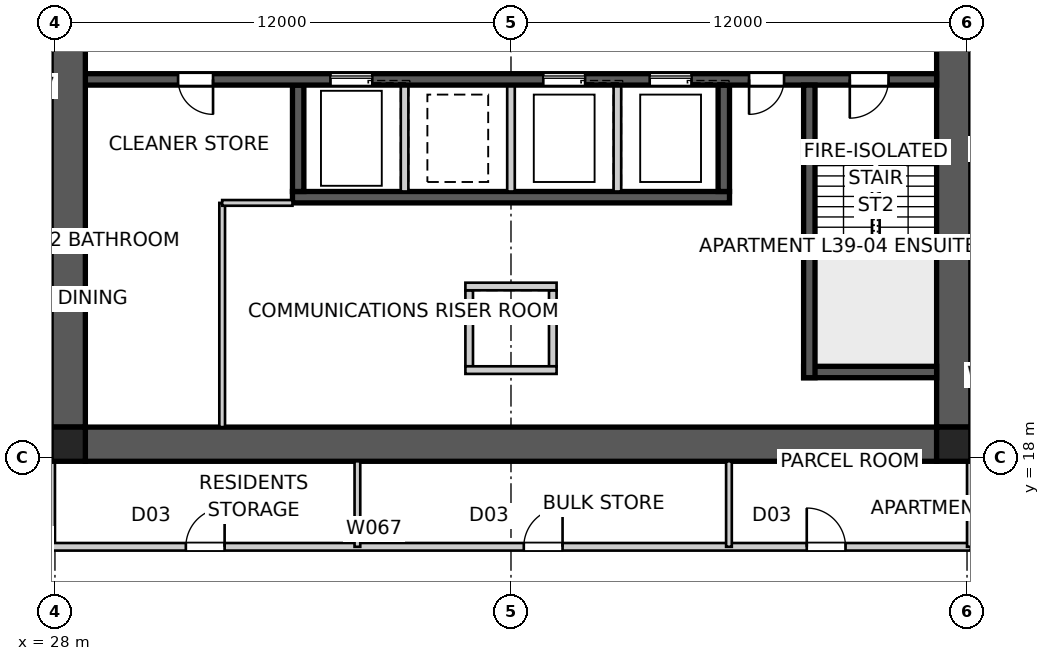
"""IFC4 building model, lengths in metres.
Left out: names, types, materials, properties, quantities, classifications, styles, units other than length and angle.
Written with IfcOpenShell. Run it as: python <this file> out.ifc"""

import sys

from ifc_helpers import new_model, si_unit, direction, frame, frame_2d, origin, origin_2d, place, context, subcontext, project, spatial, polyline, rectangle, outline, extrude, element, fill, save


model = new_model("IFC4")
c1 = context("Model", 3, precision=1e-05, world=origin(), true_north=direction((0.0, 1.0)))
c2 = subcontext(c1, "Body", "Model", "MODEL_VIEW")
j1 = project(units=[si_unit("LENGTHUNIT", "METRE"), si_unit("PLANEANGLEUNIT", "RADIAN")], contexts=[c1])
p1 = place(None, origin())
s1 = spatial("IfcSite", under=j1, at=p1, CompositionType="ELEMENT")
p2 = place(p1, origin())
s2 = spatial("IfcBuilding", under=s1, at=p2, CompositionType="ELEMENT")
p3 = place(p2, frame((0.0, 0.0, 143.8)))
s3 = spatial("IfcBuildingStorey", under=s2, at=p3, CompositionType="ELEMENT", Elevation=143.8)
p4 = place(p3, frame((51.2, 18.35, 0.0), z_axis=(0.0, 0.0, 1.0), x_axis=(-1.0, 0.0, 0.0)))
e1 = element("IfcWall", 1, at=p4, inside=s3, PredefinedType="SHEAR", context=c2, shape_type="SweptSolid", body=[
    extrude(outline(polyline([(0.0, -0.45), (22.4, -0.45), (22.4, -0.025), (22.85, -0.025), (22.85, 0.025), (22.4, 0.025), (22.4, 0.45), (0.0, 0.45), (0.0, 0.025), (-0.45, 0.025), (-0.45, -0.025), (0.0, -0.025), (0.0, -0.45)])), origin(), (0.0, 0.0, 1.0), 3.4),
])
p5 = place(p3, frame((51.65, 18.8, 0.0), z_axis=(0.0, 0.0, 1.0), x_axis=(0.0, 1.0, 0.0)))
e2 = element("IfcWall", 2, at=p5, inside=s3, PredefinedType="SHEAR", context=c2, shape_type="SweptSolid", body=[
    extrude(outline(polyline([(0.0, -0.45), (22.4, -0.45), (22.4, -0.025), (22.85, -0.025), (22.85, 0.025), (22.4, 0.025), (22.4, 0.45), (0.0, 0.45), (0.0, 0.025), (-0.45, 0.025), (-0.45, -0.025), (0.0, -0.025), (0.0, -0.45)])), origin(), (0.0, 0.0, 1.0), 3.4),
])
p6 = place(p5, frame((11.14, 0.0, 0.0)))
e3 = element("IfcOpeningElement", 3, at=p6, cuts=e2, PredefinedType="OPENING", context=c2, shape_type="SweptSolid", body=[
    extrude(rectangle(XDim=1.02, YDim=2.4, at=frame_2d((0.51, 1.2))), frame((0.0, 0.46, 0.0), z_axis=(0.0, -1.0, 0.0), x_axis=(1.0, 0.0, 0.0)), (0.0, 0.0, 1.0), 0.92),
])
p7 = place(p3, frame((28.35, 41.2, 0.0), z_axis=(0.0, 0.0, 1.0), x_axis=(0.0, -1.0, 0.0)))
e4 = element("IfcWall", 4, at=p7, inside=s3, PredefinedType="SHEAR", context=c2, shape_type="SweptSolid", body=[
    extrude(outline(polyline([(0.0, -0.45), (22.4, -0.45), (22.4, -0.025), (22.85, -0.025), (22.85, 0.025), (22.4, 0.025), (22.4, 0.45), (0.0, 0.45), (0.0, 0.025), (-0.45, 0.025), (-0.45, -0.025), (0.0, -0.025), (0.0, -0.45)])), origin(), (0.0, 0.0, 1.0), 3.4),
])
p8 = place(p7, frame((11.14, 0.0, 0.0)))
e5 = element("IfcOpeningElement", 5, at=p8, cuts=e4, PredefinedType="OPENING", context=c2, shape_type="SweptSolid", body=[
    extrude(rectangle(XDim=1.02, YDim=2.4, at=frame_2d((0.51, 1.2))), frame((0.0, 0.46, 0.0), z_axis=(0.0, -1.0, 0.0), x_axis=(1.0, 0.0, 0.0)), (0.0, 0.0, 1.0), 0.92),
])
p9 = place(p3, frame((51.2, 27.95, 0.0), z_axis=(0.0, 0.0, 1.0), x_axis=(-1.0, 0.0, 0.0)))
e6 = element("IfcWall", 6, at=p9, inside=s3, PredefinedType="SHEAR", context=c2, shape_type="SweptSolid", body=[
    extrude(rectangle(XDim=22.4, YDim=0.3, at=frame_2d((11.2, 0.0))), origin(), (0.0, 0.0, 1.0), 3.4),
])
p10 = place(p9, frame((19.04, 0.0, 0.0)))
e7 = element("IfcOpeningElement", 7, at=p10, cuts=e6, PredefinedType="OPENING", context=c2, shape_type="SweptSolid", body=[
    extrude(rectangle(XDim=0.92, YDim=2.1, at=frame_2d((0.46, 1.05))), frame((0.0, 0.16, 0.0), z_axis=(0.0, -1.0, 0.0), x_axis=(1.0, 0.0, 0.0)), (0.0, 0.0, 1.0), 0.32),
])
p11 = place(p9, frame((1.265, 0.0, 0.0)))
e8 = element("IfcOpeningElement", 8, at=p11, cuts=e6, PredefinedType="OPENING", context=c2, shape_type="SweptSolid", body=[
    extrude(rectangle(XDim=1.02, YDim=2.1, at=frame_2d((0.51, 1.05))), frame((0.0, 0.16, 0.0), z_axis=(0.0, -1.0, 0.0), x_axis=(1.0, 0.0, 0.0)), (0.0, 0.0, 1.0), 0.32),
])
p12 = place(p9, frame((4.015, 0.0, 0.0)))
e9 = element("IfcOpeningElement", 9, at=p12, cuts=e6, PredefinedType="OPENING", context=c2, shape_type="SweptSolid", body=[
    extrude(rectangle(XDim=0.92, YDim=2.1, at=frame_2d((0.46, 1.05))), frame((0.0, 0.16, 0.0), z_axis=(0.0, -1.0, 0.0), x_axis=(1.0, 0.0, 0.0)), (0.0, 0.0, 1.0), 0.32),
])
p13 = place(p9, frame((6.45, 0.0, 0.0)))
e10 = element("IfcOpeningElement", 10, at=p13, cuts=e6, PredefinedType="OPENING", context=c2, shape_type="SweptSolid", body=[
    extrude(rectangle(XDim=1.1, YDim=2.1, at=frame_2d((0.55, 1.05))), frame((0.0, 0.16, 0.0), z_axis=(0.0, -1.0, 0.0), x_axis=(1.0, 0.0, 0.0)), (0.0, 0.0, 1.0), 0.32),
])
p14 = place(p9, frame((9.25, 0.0, 0.0)))
e11 = element("IfcOpeningElement", 11, at=p14, cuts=e6, PredefinedType="OPENING", context=c2, shape_type="SweptSolid", body=[
    extrude(rectangle(XDim=1.1, YDim=2.1, at=frame_2d((0.55, 1.05))), frame((0.0, 0.16, 0.0), z_axis=(0.0, -1.0, 0.0), x_axis=(1.0, 0.0, 0.0)), (0.0, 0.0, 1.0), 0.32),
])
p15 = place(p9, frame((14.85, 0.0, 0.0)))
e12 = element("IfcOpeningElement", 12, at=p15, cuts=e6, PredefinedType="OPENING", context=c2, shape_type="SweptSolid", body=[
    extrude(rectangle(XDim=1.1, YDim=2.1, at=frame_2d((0.55, 1.05))), frame((0.0, 0.16, 0.0), z_axis=(0.0, -1.0, 0.0), x_axis=(1.0, 0.0, 0.0)), (0.0, 0.0, 1.0), 0.32),
])
p16 = place(p3, frame((45.75, 24.85, 0.0), z_axis=(0.0, 0.0, 1.0), x_axis=(-1.0, 0.0, 0.0)))
e13 = element("IfcWall", 13, at=p16, inside=s3, PredefinedType="SHEAR", context=c2, shape_type="SweptSolid", body=[
    extrude(rectangle(XDim=11.5, YDim=0.3, at=frame_2d((5.75, 0.0))), origin(), (0.0, 0.0, 1.0), 3.4),
])
p17 = place(p3, frame((45.6, 27.8, 0.0), z_axis=(0.0, 0.0, 1.0), x_axis=(0.0, -1.0, 0.0)))
e14 = element("IfcWall", 14, at=p17, inside=s3, PredefinedType="SHEAR", context=c2, shape_type="SweptSolid", body=[
    extrude(rectangle(XDim=2.8, YDim=0.3, at=frame_2d((1.4, 0.0))), origin(), (0.0, 0.0, 1.0), 3.4),
])
for number, where, z_axis, x_axis in (
    (15, (42.8, 27.8, 0.0), (0.0, 0.0, 1.0), (0.0, -1.0, 0.0)),
    (16, (40.0, 27.8, 0.0), (0.0, 0.0, 1.0), (0.0, -1.0, 0.0)),
    (17, (37.2, 27.8, 0.0), (0.0, 0.0, 1.0), (0.0, -1.0, 0.0)),
):
    element("IfcWall", number, at=place(p3, frame(where, z_axis=z_axis, x_axis=x_axis)), inside=s3, PredefinedType="SOLIDWALL", context=c2, shape_type="SweptSolid", body=[
        extrude(rectangle(XDim=2.8, YDim=0.2, at=frame_2d((1.4, 0.0))), origin(), (0.0, 0.0, 1.0), 3.4),
    ])
p18 = place(p3, frame((34.4, 27.8, 0.0), z_axis=(0.0, 0.0, 1.0), x_axis=(0.0, -1.0, 0.0)))
e18 = element("IfcWall", 18, at=p18, inside=s3, PredefinedType="SHEAR", context=c2, shape_type="SweptSolid", body=[
    extrude(rectangle(XDim=2.8, YDim=0.3, at=frame_2d((1.4, 0.0))), origin(), (0.0, 0.0, 1.0), 3.4),
])
p19 = place(p3, frame((47.85, 27.8, 0.0), z_axis=(0.0, 0.0, 1.0), x_axis=(0.0, -1.0, 0.0)))
e19 = element("IfcWall", 19, at=p19, inside=s3, PredefinedType="SHEAR", context=c2, shape_type="SweptSolid", body=[
    extrude(rectangle(XDim=7.7, YDim=0.3, at=frame_2d((3.85, 0.0))), origin(), (0.0, 0.0, 1.0), 3.4),
])
p20 = place(p3, frame((51.2, 20.25, 0.0), z_axis=(0.0, 0.0, 1.0), x_axis=(-1.0, 0.0, 0.0)))
e20 = element("IfcWall", 20, at=p20, inside=s3, PredefinedType="SHEAR", context=c2, shape_type="SweptSolid", body=[
    extrude(rectangle(XDim=3.5, YDim=0.3, at=frame_2d((1.75, 0.0))), origin(), (0.0, 0.0, 1.0), 3.4),
])
for number, where, z_axis, x_axis in (
    (21, (38.9, 22.4, 0.0), (0.0, 0.0, 1.0), (0.0, -1.0, 0.0)),
    (22, (41.1, 22.4, 0.0), (0.0, 0.0, 1.0), (0.0, -1.0, 0.0)),
):
    element("IfcWall", number, at=place(p3, frame(where, z_axis=z_axis, x_axis=x_axis)), inside=s3, PredefinedType="SOLIDWALL", context=c2, shape_type="SweptSolid", body=[
        extrude(rectangle(XDim=2.0, YDim=0.2, at=frame_2d((1.0, 0.0))), origin(), (0.0, 0.0, 1.0), 3.4),
    ])
for number, where, z_axis, x_axis in (
    (23, (38.8, 22.5, 0.0), (0.0, 0.0, 1.0), (1.0, 0.0, 0.0)),
    (24, (38.8, 20.3, 0.0), (0.0, 0.0, 1.0), (1.0, 0.0, 0.0)),
):
    element("IfcWall", number, at=place(p3, frame(where, z_axis=z_axis, x_axis=x_axis)), inside=s3, PredefinedType="SOLIDWALL", context=c2, shape_type="SweptSolid", body=[
        extrude(rectangle(XDim=2.4, YDim=0.2, at=frame_2d((1.2, 0.0))), origin(), (0.0, 0.0, 1.0), 3.4),
    ])
for number, where, z_axis, x_axis in (
    (25, (28.35, 18.35, 0.0), (0.0, 0.0, 1.0), (1.0, 0.0, 0.0)),
    (26, (51.65, 18.35, 0.0), (0.0, 0.0, 1.0), (1.0, 0.0, 0.0)),
):
    element("IfcColumn", number, at=place(p3, frame(where, z_axis=z_axis, x_axis=x_axis)), inside=s3, PredefinedType="COLUMN", context=c2, shape_type="SweptSolid", body=[
        extrude(rectangle(XDim=0.9, YDim=0.9, at=origin_2d()), origin(), (0.0, 0.0, 1.0), 3.4),
    ])
p21 = place(p3, frame((32.4, 18.8, 0.0), z_axis=(0.0, 0.0, 1.0), x_axis=(0.0, 1.0, 0.0)))
e27 = element("IfcWall", 27, at=p21, inside=s3, PredefinedType="SOLIDWALL", context=c2, shape_type="SweptSolid", body=[
    extrude(rectangle(XDim=5.9, YDim=0.15, at=frame_2d((2.95, 0.0))), origin(), (0.0, 0.0, 1.0), 3.25),
])
p22 = place(p3, frame((32.4, 24.7, 0.0), z_axis=(0.0, 0.0, 1.0), x_axis=(1.0, 0.0, 0.0)))
e28 = element("IfcWall", 28, at=p22, inside=s3, PredefinedType="SOLIDWALL", context=c2, shape_type="SweptSolid", body=[
    extrude(rectangle(XDim=1.85, YDim=0.15, at=frame_2d((0.925, 0.0))), origin(), (0.0, 0.0, 1.0), 3.25),
])
p23 = place(p3, frame((27.9, 17.95, 0.0), z_axis=(0.0, 0.0, 1.0), x_axis=(0.0, -1.0, 0.0)))
e29 = element("IfcWall", 29, at=p23, inside=s3, PredefinedType="PARTITIONING", context=c2, shape_type="SweptSolid", body=[
    extrude(rectangle(XDim=2.3, YDim=0.2, at=frame_2d((1.15, 0.0))), origin(), (0.0, 0.0, 1.0), 3.25),
])
p24 = place(p3, frame((27.9, 15.65, 0.0), z_axis=(0.0, 0.0, 1.0), x_axis=(1.0, 0.0, 0.0)))
e30 = element("IfcWall", 30, at=p24, inside=s3, PredefinedType="PARTITIONING", context=c2, shape_type="SweptSolid", body=[
    extrude(rectangle(XDim=24.2, YDim=0.2, at=frame_2d((12.1, 0.0))), origin(), (0.0, 0.0, 1.0), 3.25),
])
p25 = place(p24, frame((12.437, 0.0, 0.0)))
e31 = element("IfcOpeningElement", 31, at=p25, cuts=e30, PredefinedType="OPENING", context=c2, shape_type="SweptSolid", body=[
    extrude(rectangle(XDim=1.02, YDim=2.1, at=frame_2d((0.51, 1.05))), frame((0.0, 0.11, 0.0), z_axis=(0.0, -1.0, 0.0), x_axis=(1.0, 0.0, 0.0)), (0.0, 0.0, 1.0), 0.22),
])
p26 = place(p24, frame((3.544, 0.0, 0.0)))
e32 = element("IfcOpeningElement", 32, at=p26, cuts=e30, PredefinedType="OPENING", context=c2, shape_type="SweptSolid", body=[
    extrude(rectangle(XDim=1.02, YDim=2.1, at=frame_2d((0.51, 1.05))), frame((0.0, 0.11, 0.0), z_axis=(0.0, -1.0, 0.0), x_axis=(1.0, 0.0, 0.0)), (0.0, 0.0, 1.0), 0.22),
])
p27 = place(p24, frame((19.883, 0.0, 0.0)))
e33 = element("IfcOpeningElement", 33, at=p27, cuts=e30, PredefinedType="OPENING", context=c2, shape_type="SweptSolid", body=[
    extrude(rectangle(XDim=1.02, YDim=2.1, at=frame_2d((0.51, 1.05))), frame((0.0, 0.11, 0.0), z_axis=(0.0, -1.0, 0.0), x_axis=(1.0, 0.0, 0.0)), (0.0, 0.0, 1.0), 0.22),
])
p28 = place(p3, frame((52.1, 15.65, 0.0), z_axis=(0.0, 0.0, 1.0), x_axis=(0.0, 1.0, 0.0)))
e34 = element("IfcWall", 34, at=p28, inside=s3, PredefinedType="PARTITIONING", context=c2, shape_type="SweptSolid", body=[
    extrude(rectangle(XDim=3.17, YDim=0.2, at=frame_2d((1.585, 0.0))), origin(), (0.0, 0.0, 1.0), 3.25),
])
p29 = place(p3, frame((35.958, 15.65, 0.0), z_axis=(0.0, 0.0, 1.0), x_axis=(0.0, 1.0, 0.0)))
e35 = element("IfcWall", 35, at=p29, inside=s3, PredefinedType="SOLIDWALL", context=c2, shape_type="SweptSolid", body=[
    extrude(rectangle(XDim=2.25, YDim=0.15, at=frame_2d((1.125, 0.0))), origin(), (0.0, 0.0, 1.0), 3.25),
])
p30 = place(p3, frame((45.735, 15.65, 0.0), z_axis=(0.0, 0.0, 1.0), x_axis=(0.0, 1.0, 0.0)))
e36 = element("IfcWall", 36, at=p30, inside=s3, PredefinedType="SOLIDWALL", context=c2, shape_type="SweptSolid", body=[
    extrude(rectangle(XDim=2.25, YDim=0.15, at=frame_2d((1.125, 0.0))), origin(), (0.0, 0.0, 1.0), 2.796),
])
p31 = place(p10, origin())
e37 = element("IfcDoor", 37, at=p31, inside=s3, OperationType="SINGLE_SWING_LEFT", PredefinedType="DOOR", context=c2, shape_type="SweptSolid", body=[
    extrude(rectangle(XDim=0.92, YDim=2.1, at=frame_2d((0.46, 1.05))), frame((0.0, 0.025, 0.0), z_axis=(0.0, -1.0, 0.0), x_axis=(1.0, 0.0, 0.0)), (0.0, 0.0, 1.0), 0.05),
])
fill(e7, e37)
p32 = place(p11, origin())
e38 = element("IfcDoor", 38, at=p32, inside=s3, OperationType="SINGLE_SWING_RIGHT", PredefinedType="DOOR", context=c2, shape_type="SweptSolid", body=[
    extrude(rectangle(XDim=1.02, YDim=2.1, at=frame_2d((0.51, 1.05))), frame((0.0, 0.025, 0.0), z_axis=(0.0, -1.0, 0.0), x_axis=(1.0, 0.0, 0.0)), (0.0, 0.0, 1.0), 0.05),
])
fill(e8, e38)
p33 = place(p12, origin())
e39 = element("IfcDoor", 39, at=p33, inside=s3, OperationType="SINGLE_SWING_RIGHT", PredefinedType="DOOR", context=c2, shape_type="SweptSolid", body=[
    extrude(rectangle(XDim=0.92, YDim=2.1, at=frame_2d((0.46, 1.05))), frame((0.0, 0.025, 0.0), z_axis=(0.0, -1.0, 0.0), x_axis=(1.0, 0.0, 0.0)), (0.0, 0.0, 1.0), 0.05),
])
fill(e9, e39)
p34 = place(p25, origin())
e40 = element("IfcDoor", 40, at=p34, inside=s3, OperationType="SINGLE_SWING_RIGHT", PredefinedType="DOOR", context=c2, shape_type="SweptSolid", body=[
    extrude(rectangle(XDim=1.02, YDim=2.1, at=frame_2d((0.51, 1.05))), frame((0.0, 0.025, 0.0), z_axis=(0.0, -1.0, 0.0), x_axis=(1.0, 0.0, 0.0)), (0.0, 0.0, 1.0), 0.05),
])
fill(e31, e40)
p35 = place(p26, origin())
e41 = element("IfcDoor", 41, at=p35, inside=s3, OperationType="SINGLE_SWING_RIGHT", PredefinedType="DOOR", context=c2, shape_type="SweptSolid", body=[
    extrude(rectangle(XDim=1.02, YDim=2.1, at=frame_2d((0.51, 1.05))), frame((0.0, 0.025, 0.0), z_axis=(0.0, -1.0, 0.0), x_axis=(1.0, 0.0, 0.0)), (0.0, 0.0, 1.0), 0.05),
])
fill(e32, e41)
p36 = place(p27, origin())
e42 = element("IfcDoor", 42, at=p36, inside=s3, OperationType="SINGLE_SWING_LEFT", PredefinedType="DOOR", context=c2, shape_type="SweptSolid", body=[
    extrude(rectangle(XDim=1.02, YDim=2.1, at=frame_2d((0.51, 1.05))), frame((0.0, 0.025, 0.0), z_axis=(0.0, -1.0, 0.0), x_axis=(1.0, 0.0, 0.0)), (0.0, 0.0, 1.0), 0.05),
])
fill(e33, e42)
p37 = place(p13, origin())
e43 = element("IfcDoor", 43, at=p37, inside=s3, OperationType="SLIDING_TO_LEFT", PredefinedType="DOOR", context=c2, shape_type="SweptSolid", body=[
    extrude(rectangle(XDim=1.1, YDim=2.1, at=frame_2d((0.55, 1.05))), frame((0.0, 0.025, 0.0), z_axis=(0.0, -1.0, 0.0), x_axis=(1.0, 0.0, 0.0)), (0.0, 0.0, 1.0), 0.05),
])
fill(e10, e43)
p38 = place(p14, origin())
e44 = element("IfcDoor", 44, at=p38, inside=s3, OperationType="SLIDING_TO_LEFT", PredefinedType="DOOR", context=c2, shape_type="SweptSolid", body=[
    extrude(rectangle(XDim=1.1, YDim=2.1, at=frame_2d((0.55, 1.05))), frame((0.0, 0.025, 0.0), z_axis=(0.0, -1.0, 0.0), x_axis=(1.0, 0.0, 0.0)), (0.0, 0.0, 1.0), 0.05),
])
fill(e11, e44)
p39 = place(p15, origin())
e45 = element("IfcDoor", 45, at=p39, inside=s3, OperationType="SLIDING_TO_LEFT", PredefinedType="DOOR", context=c2, shape_type="SweptSolid", body=[
    extrude(rectangle(XDim=1.1, YDim=2.1, at=frame_2d((0.55, 1.05))), frame((0.0, 0.025, 0.0), z_axis=(0.0, -1.0, 0.0), x_axis=(1.0, 0.0, 0.0)), (0.0, 0.0, 1.0), 0.05),
])
fill(e12, e45)
save(model, sys.argv[1])
